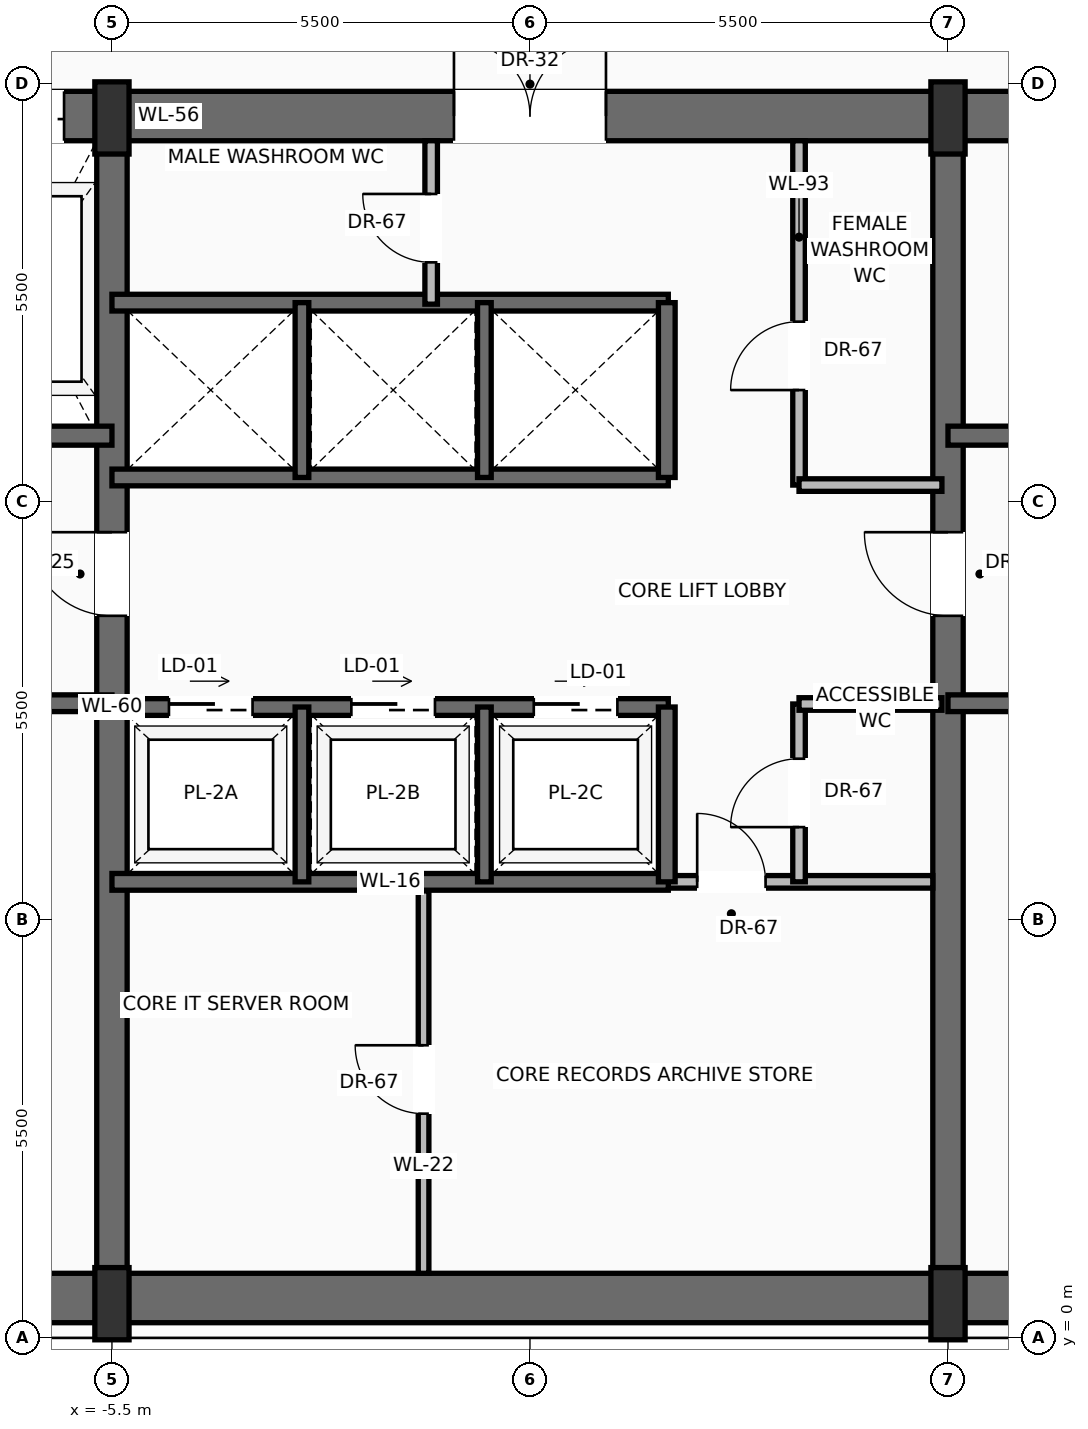
"""IFC4 building model, lengths in metres.
Left out: names, types, materials, properties, quantities, classifications, styles, units other than length and angle.
Written with IfcOpenShell. Run it as: python <this file> out.ifc"""

import sys

from ifc_helpers import new_model, si_unit, direction, frame, frame_2d, origin, origin_2d, place, context, subcontext, project, spatial, rectangle, extrude, source, transform, mapped, element, fill, save


model = new_model("IFC4")
c1 = context("Model", 3, precision=1e-05, world=origin(), true_north=direction((0.0, 1.0)))
c2 = subcontext(c1, "Body", "Model", "MODEL_VIEW")
j1 = project(units=[si_unit("LENGTHUNIT", "METRE"), si_unit("PLANEANGLEUNIT", "RADIAN")], contexts=[c1])
p1 = place(None, origin())
s1 = spatial("IfcSite", under=j1, at=p1, CompositionType="ELEMENT")
p2 = place(p1, origin())
s2 = spatial("IfcBuilding", under=s1, at=p2, CompositionType="ELEMENT")
p3 = place(p2, frame((0.0, 0.0, 196.9)))
s3 = spatial("IfcBuildingStorey", under=s2, at=p3, CompositionType="ELEMENT", Elevation=196.9)
p4 = place(p3, frame((-10.65, 0.525, 0.0), z_axis=(0.0, 0.0, 1.0), x_axis=(1.0, 0.0, 0.0)))
e1 = element("IfcWall", 1, at=p4, inside=s3, PredefinedType="SHEAR", context=c2, shape_type="SweptSolid", body=[
    extrude(rectangle(XDim=21.3, YDim=0.65, at=frame_2d((10.65, 0.0))), origin(), (0.0, 0.0, 1.0), 3.47),
])
p5 = place(p3, frame((-10.8, 16.075, 0.0), z_axis=(0.0, 0.0, 1.0), x_axis=(1.0, 0.0, 0.0)))
e2 = element("IfcWall", 2, at=p5, inside=s3, PredefinedType="SHEAR", context=c2, shape_type="SweptSolid", body=[
    extrude(rectangle(XDim=21.6, YDim=0.65, at=frame_2d((10.8, 0.0))), origin(), (0.0, 0.0, 1.0), 3.47),
])
p6 = place(p5, frame((3.37, 0.0, 0.0)))
e3 = element("IfcOpeningElement", 3, at=p6, cuts=e2, PredefinedType="OPENING", context=c2, shape_type="SweptSolid", body=[
    extrude(rectangle(XDim=1.3, YDim=2.3, at=frame_2d((0.65, 1.15))), frame((0.0, 0.335, 0.0), z_axis=(0.0, -1.0, 0.0), x_axis=(1.0, 0.0, 0.0)), (0.0, 0.0, 1.0), 0.67),
])
p7 = place(p5, frame((9.8, 0.0, 0.0)))
e4 = element("IfcOpeningElement", 4, at=p7, cuts=e2, PredefinedType="OPENING", context=c2, shape_type="SweptSolid", body=[
    extrude(rectangle(XDim=2.0, YDim=2.4, at=frame_2d((1.0, 1.2))), frame((0.0, 0.335, 0.0), z_axis=(0.0, -1.0, 0.0), x_axis=(1.0, 0.0, 0.0)), (0.0, 0.0, 1.0), 0.67),
])
p8 = place(p3, frame((-5.5, 0.525, 0.0), z_axis=(0.0, 0.0, 1.0), x_axis=(0.0, 1.0, 0.0)))
e5 = element("IfcWall", 5, at=p8, inside=s3, PredefinedType="SHEAR", context=c2, shape_type="SweptSolid", body=[
    extrude(rectangle(XDim=15.55, YDim=0.4, at=frame_2d((7.775, 0.0))), origin(), (0.0, 0.0, 1.0), 3.47),
])
p9 = place(p8, frame((8.975, 0.0, 0.0)))
e6 = element("IfcOpeningElement", 6, at=p9, cuts=e5, PredefinedType="OPENING", context=c2, shape_type="SweptSolid", body=[
    extrude(rectangle(XDim=1.1, YDim=2.2, at=frame_2d((0.55, 1.1))), frame((0.0, 0.21, 0.0), z_axis=(0.0, -1.0, 0.0), x_axis=(1.0, 0.0, 0.0)), (0.0, 0.0, 1.0), 0.42),
])
p10 = place(p3, frame((5.5, 0.525, 0.0), z_axis=(0.0, 0.0, 1.0), x_axis=(0.0, 1.0, 0.0)))
e7 = element("IfcWall", 7, at=p10, inside=s3, PredefinedType="SHEAR", context=c2, shape_type="SweptSolid", body=[
    extrude(rectangle(XDim=15.55, YDim=0.4, at=frame_2d((7.775, 0.0))), origin(), (0.0, 0.0, 1.0), 3.47),
])
p11 = place(p10, frame((8.975, 0.0, 0.0)))
e8 = element("IfcOpeningElement", 8, at=p11, cuts=e7, PredefinedType="OPENING", context=c2, shape_type="SweptSolid", body=[
    extrude(rectangle(XDim=1.1, YDim=2.2, at=frame_2d((0.55, 1.1))), frame((0.0, 0.21, 0.0), z_axis=(0.0, -1.0, 0.0), x_axis=(1.0, 0.0, 0.0)), (0.0, 0.0, 1.0), 0.42),
])
m1 = source(origin(), c2, "Body", "SweptSolid", [
    extrude(rectangle(XDim=0.45, YDim=0.95, at=origin_2d()), origin(), (0.0, 0.0, 1.0), 3.7),
])
for number, where, z_axis, x_axis in (
    (9, (-5.5, 0.45, 0.0), (0.0, 0.0, 1.0), (1.0, 0.0, 0.0)),
    (10, (5.5, 0.45, 0.0), (0.0, 0.0, 1.0), (1.0, 0.0, 0.0)),
    (11, (-5.5, 16.05, 0.0), (0.0, 0.0, 1.0), (1.0, 0.0, 0.0)),
    (12, (5.5, 16.05, 0.0), (0.0, 0.0, 1.0), (1.0, 0.0, 0.0)),
):
    element("IfcColumn", number, at=place(p3, frame(where, z_axis=z_axis, x_axis=x_axis)), inside=s3, PredefinedType="PILASTER", context=c2, shape_type="MappedRepresentation", body=[
        mapped(m1, transform((0.0, 0.0, 0.0), scale=1.0)),
    ])
p12 = place(p3, frame((-5.5, 8.35, 0.0), z_axis=(0.0, 0.0, 1.0), x_axis=(-1.0, 0.0, 0.0)))
e13 = element("IfcWall", 13, at=p12, inside=s3, PredefinedType="SOLIDWALL", context=c2, shape_type="SweptSolid", body=[
    extrude(rectangle(XDim=4.65, YDim=0.22, at=frame_2d((2.325, 0.0))), origin(), (0.0, 0.0, 1.0), 3.47),
])
p13 = place(p12, frame((2.5, 0.0, 0.0)))
e14 = element("IfcOpeningElement", 14, at=p13, cuts=e13, PredefinedType="OPENING", context=c2, shape_type="SweptSolid", body=[
    extrude(rectangle(XDim=1.15, YDim=2.2, at=frame_2d((0.575, 1.1))), frame((0.0, 0.12, 0.0), z_axis=(0.0, -1.0, 0.0), x_axis=(1.0, 0.0, 0.0)), (0.0, 0.0, 1.0), 0.24),
])
p14 = place(p3, frame((-5.5, 11.87, 0.0), z_axis=(0.0, 0.0, 1.0), x_axis=(-1.0, 0.0, 0.0)))
e15 = element("IfcWall", 15, at=p14, inside=s3, PredefinedType="SOLIDWALL", context=c2, shape_type="SweptSolid", body=[
    extrude(rectangle(XDim=4.65, YDim=0.25, at=frame_2d((2.325, 0.0))), origin(), (0.0, 0.0, 1.0), 3.47),
])
p15 = place(p14, frame((2.95, 0.0, 0.0)))
e16 = element("IfcOpeningElement", 16, at=p15, cuts=e15, PredefinedType="OPENING", context=c2, shape_type="SweptSolid", body=[
    extrude(rectangle(XDim=1.2, YDim=2.25, at=frame_2d((0.6, 1.125))), frame((0.0, 0.135, 0.0), z_axis=(0.0, -1.0, 0.0), x_axis=(1.0, 0.0, 0.0)), (0.0, 0.0, 1.0), 0.27),
])
p16 = place(p3, frame((10.15, 8.35, 0.0), z_axis=(0.0, 0.0, 1.0), x_axis=(-1.0, 0.0, 0.0)))
e17 = element("IfcWall", 17, at=p16, inside=s3, PredefinedType="SOLIDWALL", context=c2, shape_type="SweptSolid", body=[
    extrude(rectangle(XDim=4.65, YDim=0.22, at=frame_2d((2.325, 0.0))), origin(), (0.0, 0.0, 1.0), 3.47),
])
p17 = place(p16, frame((1.0, 0.0, 0.0)))
e18 = element("IfcOpeningElement", 18, at=p17, cuts=e17, PredefinedType="OPENING", context=c2, shape_type="SweptSolid", body=[
    extrude(rectangle(XDim=1.15, YDim=2.2, at=frame_2d((0.575, 1.1))), frame((0.0, 0.12, 0.0), z_axis=(0.0, -1.0, 0.0), x_axis=(1.0, 0.0, 0.0)), (0.0, 0.0, 1.0), 0.24),
])
p18 = place(p3, frame((10.15, 11.87, 0.0), z_axis=(0.0, 0.0, 1.0), x_axis=(-1.0, 0.0, 0.0)))
e19 = element("IfcWall", 19, at=p18, inside=s3, PredefinedType="SOLIDWALL", context=c2, shape_type="SweptSolid", body=[
    extrude(rectangle(XDim=4.65, YDim=0.25, at=frame_2d((2.325, 0.0))), origin(), (0.0, 0.0, 1.0), 3.47),
])
p19 = place(p18, frame((0.5, 0.0, 0.0)))
e20 = element("IfcOpeningElement", 20, at=p19, cuts=e19, PredefinedType="OPENING", context=c2, shape_type="SweptSolid", body=[
    extrude(rectangle(XDim=1.2, YDim=2.25, at=frame_2d((0.6, 1.125))), frame((0.0, 0.135, 0.0), z_axis=(0.0, -1.0, 0.0), x_axis=(1.0, 0.0, 0.0)), (0.0, 0.0, 1.0), 0.27),
])
p20 = place(p3, frame((1.82, 6.0, 0.0), z_axis=(0.0, 0.0, 1.0), x_axis=(1.0, 0.0, 0.0)))
e21 = element("IfcWall", 21, at=p20, inside=s3, PredefinedType="PARTITIONING", context=c2, shape_type="SweptSolid", body=[
    extrude(rectangle(XDim=3.48, YDim=0.165, at=frame_2d((1.74, 0.0))), origin(), (0.0, 0.0, 1.0), 3.462),
])
p21 = place(p20, frame((0.38, 0.0, 0.0)))
e22 = element("IfcOpeningElement", 22, at=p21, cuts=e21, PredefinedType="OPENING", context=c2, shape_type="SweptSolid", body=[
    extrude(rectangle(XDim=0.9, YDim=2.1, at=frame_2d((0.45, 1.05))), frame((0.0, 0.093, 0.0), z_axis=(0.0, -1.0, 0.0), x_axis=(1.0, 0.0, 0.0)), (0.0, 0.0, 1.0), 0.185),
])
p22 = place(p3, frame((-1.4, 0.85, 0.0), z_axis=(0.0, 0.0, 1.0), x_axis=(0.0, 1.0, 0.0)))
e23 = element("IfcWall", 23, at=p22, inside=s3, PredefinedType="PARTITIONING", context=c2, shape_type="SweptSolid", body=[
    extrude(rectangle(XDim=5.03, YDim=0.14, at=frame_2d((2.515, 0.0))), origin(), (0.0, 0.0, 1.0), 3.462),
])
p23 = place(p22, frame((2.1, 0.0, 0.0)))
e24 = element("IfcOpeningElement", 24, at=p23, cuts=e23, PredefinedType="OPENING", context=c2, shape_type="SweptSolid", body=[
    extrude(rectangle(XDim=0.9, YDim=2.1, at=frame_2d((0.45, 1.05))), frame((0.0, 0.08, 0.0), z_axis=(0.0, -1.0, 0.0), x_axis=(1.0, 0.0, 0.0)), (0.0, 0.0, 1.0), 0.16),
])
p24 = place(p3, frame((3.54, 6.0, 0.0), z_axis=(0.0, 0.0, 1.0), x_axis=(0.0, 1.0, 0.0)))
e25 = element("IfcWall", 25, at=p24, inside=s3, PredefinedType="PARTITIONING", context=c2, shape_type="SweptSolid", body=[
    extrude(rectangle(XDim=2.34, YDim=0.165, at=frame_2d((1.17, 0.0))), origin(), (0.0, 0.0, 1.0), 3.462),
])
p25 = place(p24, frame((0.72, 0.0, 0.0)))
e26 = element("IfcOpeningElement", 26, at=p25, cuts=e25, PredefinedType="OPENING", context=c2, shape_type="SweptSolid", body=[
    extrude(rectangle(XDim=0.9, YDim=2.1, at=frame_2d((0.45, 1.05))), frame((0.0, 0.093, 0.0), z_axis=(0.0, -1.0, 0.0), x_axis=(1.0, 0.0, 0.0)), (0.0, 0.0, 1.0), 0.185),
])
p26 = place(p3, frame((3.54, 8.34, 0.0), z_axis=(0.0, 0.0, 1.0), x_axis=(1.0, 0.0, 0.0)))
e27 = element("IfcWall", 27, at=p26, inside=s3, PredefinedType="PARTITIONING", context=c2, shape_type="SweptSolid", body=[
    extrude(rectangle(XDim=1.88, YDim=0.165, at=frame_2d((0.94, 0.0))), origin(), (0.0, 0.0, 1.0), 3.462),
])
p27 = place(p3, frame((-5.5, 6.0, 0.0), z_axis=(0.0, 0.0, 1.0), x_axis=(1.0, 0.0, 0.0)))
e28 = element("IfcWall", 28, at=p27, inside=s3, PredefinedType="SOLIDWALL", context=c2, shape_type="SweptSolid", body=[
    extrude(rectangle(XDim=7.32, YDim=0.22, at=frame_2d((3.66, 0.0))), origin(), (0.0, 0.0, 1.0), 3.47),
])
p28 = place(p3, frame((-5.5, 8.3, 0.0), z_axis=(0.0, 0.0, 1.0), x_axis=(1.0, 0.0, 0.0)))
e29 = element("IfcWall", 29, at=p28, inside=s3, PredefinedType="SOLIDWALL", context=c2, shape_type="SweptSolid", body=[
    extrude(rectangle(XDim=7.32, YDim=0.22, at=frame_2d((3.66, 0.0))), origin(), (0.0, 0.0, 1.0), 3.47),
])
p29 = place(p28, frame((0.75, 0.0, 0.0)))
e30 = element("IfcOpeningElement", 30, at=p29, cuts=e29, PredefinedType="OPENING", context=c2, shape_type="SweptSolid", body=[
    extrude(rectangle(XDim=1.1, YDim=2.2, at=frame_2d((0.55, 1.1))), frame((0.0, 0.12, 0.0), z_axis=(0.0, -1.0, 0.0), x_axis=(1.0, 0.0, 0.0)), (0.0, 0.0, 1.0), 0.24),
])
p30 = place(p28, frame((3.15, 0.0, 0.0)))
e31 = element("IfcOpeningElement", 31, at=p30, cuts=e29, PredefinedType="OPENING", context=c2, shape_type="SweptSolid", body=[
    extrude(rectangle(XDim=1.1, YDim=2.2, at=frame_2d((0.55, 1.1))), frame((0.0, 0.12, 0.0), z_axis=(0.0, -1.0, 0.0), x_axis=(1.0, 0.0, 0.0)), (0.0, 0.0, 1.0), 0.24),
])
p31 = place(p28, frame((5.55, 0.0, 0.0)))
e32 = element("IfcOpeningElement", 32, at=p31, cuts=e29, PredefinedType="OPENING", context=c2, shape_type="SweptSolid", body=[
    extrude(rectangle(XDim=1.1, YDim=2.2, at=frame_2d((0.55, 1.1))), frame((0.0, 0.12, 0.0), z_axis=(0.0, -1.0, 0.0), x_axis=(1.0, 0.0, 0.0)), (0.0, 0.0, 1.0), 0.24),
])
p32 = place(p3, frame((1.8, 6.0, 0.0), z_axis=(0.0, 0.0, 1.0), x_axis=(0.0, 1.0, 0.0)))
e33 = element("IfcWall", 33, at=p32, inside=s3, PredefinedType="SOLIDWALL", context=c2, shape_type="SweptSolid", body=[
    extrude(rectangle(XDim=2.3, YDim=0.22, at=frame_2d((1.15, 0.0))), origin(), (0.0, 0.0, 1.0), 3.47),
])
for number, where, z_axis, x_axis in (
    (34, (-3.0, 6.0, 0.0), (0.0, 0.0, 1.0), (0.0, 1.0, 0.0)),
    (35, (-0.6, 6.0, 0.0), (0.0, 0.0, 1.0), (0.0, 1.0, 0.0)),
):
    element("IfcWall", number, at=place(p3, frame(where, z_axis=z_axis, x_axis=x_axis)), inside=s3, PredefinedType="SOLIDWALL", context=c2, shape_type="SweptSolid", body=[
        extrude(rectangle(XDim=2.3, YDim=0.18, at=frame_2d((1.15, 0.0))), origin(), (0.0, 0.0, 1.0), 3.47),
    ])
for number, where, z_axis, x_axis in (
    (36, (-5.5, 11.32, 0.0), (0.0, 0.0, 1.0), (1.0, 0.0, 0.0)),
    (37, (-5.5, 13.62, 0.0), (0.0, 0.0, 1.0), (1.0, 0.0, 0.0)),
):
    element("IfcWall", number, at=place(p3, frame(where, z_axis=z_axis, x_axis=x_axis)), inside=s3, PredefinedType="SOLIDWALL", context=c2, shape_type="SweptSolid", body=[
        extrude(rectangle(XDim=7.32, YDim=0.22, at=frame_2d((3.66, 0.0))), origin(), (0.0, 0.0, 1.0), 3.47),
    ])
p33 = place(p3, frame((1.8, 11.32, 0.0), z_axis=(0.0, 0.0, 1.0), x_axis=(0.0, 1.0, 0.0)))
e38 = element("IfcWall", 38, at=p33, inside=s3, PredefinedType="SOLIDWALL", context=c2, shape_type="SweptSolid", body=[
    extrude(rectangle(XDim=2.3, YDim=0.22, at=frame_2d((1.15, 0.0))), origin(), (0.0, 0.0, 1.0), 3.47),
])
for number, where, z_axis, x_axis in (
    (39, (-3.0, 11.32, 0.0), (0.0, 0.0, 1.0), (0.0, 1.0, 0.0)),
    (40, (-0.6, 11.32, 0.0), (0.0, 0.0, 1.0), (0.0, 1.0, 0.0)),
):
    element("IfcWall", number, at=place(p3, frame(where, z_axis=z_axis, x_axis=x_axis)), inside=s3, PredefinedType="SOLIDWALL", context=c2, shape_type="SweptSolid", body=[
        extrude(rectangle(XDim=2.3, YDim=0.18, at=frame_2d((1.15, 0.0))), origin(), (0.0, 0.0, 1.0), 3.47),
    ])
p34 = place(p3, frame((-1.3, 13.6, 0.0), z_axis=(0.0, 0.0, 1.0), x_axis=(0.0, 1.0, 0.0)))
e41 = element("IfcWall", 41, at=p34, inside=s3, PredefinedType="PARTITIONING", context=c2, shape_type="SweptSolid", body=[
    extrude(rectangle(XDim=2.15, YDim=0.165, at=frame_2d((1.075, 0.0))), origin(), (0.0, 0.0, 1.0), 3.462),
])
p35 = place(p34, frame((0.55, 0.0, 0.0)))
e42 = element("IfcOpeningElement", 42, at=p35, cuts=e41, PredefinedType="OPENING", context=c2, shape_type="SweptSolid", body=[
    extrude(rectangle(XDim=0.9, YDim=2.1, at=frame_2d((0.45, 1.05))), frame((0.0, 0.093, 0.0), z_axis=(0.0, -1.0, 0.0), x_axis=(1.0, 0.0, 0.0)), (0.0, 0.0, 1.0), 0.185),
])
p36 = place(p3, frame((3.54, 11.22, 0.0), z_axis=(0.0, 0.0, 1.0), x_axis=(0.0, 1.0, 0.0)))
e43 = element("IfcWall", 43, at=p36, inside=s3, PredefinedType="PARTITIONING", context=c2, shape_type="SweptSolid", body=[
    extrude(rectangle(XDim=4.53, YDim=0.165, at=frame_2d((2.265, 0.0))), origin(), (0.0, 0.0, 1.0), 3.462),
])
p37 = place(p36, frame((1.25, 0.0, 0.0)))
e44 = element("IfcOpeningElement", 44, at=p37, cuts=e43, PredefinedType="OPENING", context=c2, shape_type="SweptSolid", body=[
    extrude(rectangle(XDim=0.9, YDim=2.1, at=frame_2d((0.45, 1.05))), frame((0.0, 0.093, 0.0), z_axis=(0.0, -1.0, 0.0), x_axis=(1.0, 0.0, 0.0)), (0.0, 0.0, 1.0), 0.185),
])
p38 = place(p3, frame((3.54, 11.22, 0.0), z_axis=(0.0, 0.0, 1.0), x_axis=(1.0, 0.0, 0.0)))
e45 = element("IfcWall", 45, at=p38, inside=s3, PredefinedType="PARTITIONING", context=c2, shape_type="SweptSolid", body=[
    extrude(rectangle(XDim=1.88, YDim=0.165, at=frame_2d((0.94, 0.0))), origin(), (0.0, 0.0, 1.0), 3.462),
])
m2 = source(origin(), c2, "Body", "SweptSolid", [
    extrude(rectangle(XDim=1.1, YDim=2.2, at=frame_2d((0.55, 1.1))), frame((0.0, 0.025, 0.0), z_axis=(0.0, -1.0, 0.0), x_axis=(1.0, 0.0, 0.0)), (0.0, 0.0, 1.0), 0.05),
])
p39 = place(p9, origin())
e46 = element("IfcDoor", 46, at=p39, inside=s3, OperationType="SINGLE_SWING_RIGHT", PredefinedType="DOOR", context=c2, shape_type="MappedRepresentation", body=[
    mapped(m2, transform((0.0, 0.0, 0.0), scale=1.0)),
])
fill(e6, e46)
m3 = source(origin(), c2, "Body", "SweptSolid", [
    extrude(rectangle(XDim=1.3, YDim=2.3, at=frame_2d((0.65, 1.15))), frame((0.0, 0.025, 0.0), z_axis=(0.0, -1.0, 0.0), x_axis=(1.0, 0.0, 0.0)), (0.0, 0.0, 1.0), 0.05),
])
p40 = place(p6, origin())
e47 = element("IfcDoor", 47, at=p40, inside=s3, OperationType="SLIDING_TO_RIGHT", PredefinedType="DOOR", context=c2, shape_type="MappedRepresentation", body=[
    mapped(m3, transform((0.0, 0.0, 0.0), scale=1.0)),
])
fill(e3, e47)
p41 = place(p11, origin())
e48 = element("IfcDoor", 48, at=p41, inside=s3, OperationType="SINGLE_SWING_RIGHT", PredefinedType="DOOR", context=c2, shape_type="MappedRepresentation", body=[
    mapped(m2, transform((0.0, 0.0, 0.0), scale=1.0)),
])
fill(e8, e48)
m4 = source(origin(), c2, "Body", "SweptSolid", [
    extrude(rectangle(XDim=2.0, YDim=2.4, at=frame_2d((1.0, 1.2))), frame((0.0, 0.025, 0.0), z_axis=(0.0, -1.0, 0.0), x_axis=(1.0, 0.0, 0.0)), (0.0, 0.0, 1.0), 0.05),
])
p42 = place(p7, origin())
e49 = element("IfcDoor", 49, at=p42, inside=s3, OperationType="DOUBLE_DOOR_SINGLE_SWING", PredefinedType="DOOR", context=c2, shape_type="MappedRepresentation", body=[
    mapped(m4, transform((0.0, 0.0, 0.0), scale=1.0)),
])
fill(e4, e49)
m5 = source(origin(), c2, "Body", "SweptSolid", [
    extrude(rectangle(XDim=0.9, YDim=2.1, at=frame_2d((0.45, 1.05))), frame((0.0, 0.025, 0.0), z_axis=(0.0, -1.0, 0.0), x_axis=(1.0, 0.0, 0.0)), (0.0, 0.0, 1.0), 0.05),
])
p43 = place(p21, origin())
e50 = element("IfcDoor", 50, at=p43, inside=s3, OperationType="SINGLE_SWING_LEFT", PredefinedType="DOOR", context=c2, shape_type="MappedRepresentation", body=[
    mapped(m5, transform((0.0, 0.0, 0.0), scale=1.0)),
])
fill(e22, e50)
p44 = place(p23, origin())
e51 = element("IfcDoor", 51, at=p44, inside=s3, OperationType="SINGLE_SWING_RIGHT", PredefinedType="DOOR", context=c2, shape_type="MappedRepresentation", body=[
    mapped(m5, transform((0.0, 0.0, 0.0), scale=1.0)),
])
fill(e24, e51)
p45 = place(p25, origin())
e52 = element("IfcDoor", 52, at=p45, inside=s3, OperationType="SINGLE_SWING_LEFT", PredefinedType="DOOR", context=c2, shape_type="MappedRepresentation", body=[
    mapped(m5, transform((0.0, 0.0, 0.0), scale=1.0)),
])
fill(e26, e52)
m6 = source(origin(), c2, "Body", "SweptSolid", [
    extrude(rectangle(XDim=1.1, YDim=2.2, at=frame_2d((0.55, 1.1))), frame((0.0, 0.025, 0.0), z_axis=(0.0, -1.0, 0.0), x_axis=(1.0, 0.0, 0.0)), (0.0, 0.0, 1.0), 0.05),
])
p46 = place(p29, origin())
e53 = element("IfcDoor", 53, at=p46, inside=s3, OperationType="SLIDING_TO_LEFT", PredefinedType="DOOR", context=c2, shape_type="MappedRepresentation", body=[
    mapped(m6, transform((0.0, 0.0, 0.0), scale=1.0)),
])
fill(e30, e53)
p47 = place(p30, origin())
e54 = element("IfcDoor", 54, at=p47, inside=s3, OperationType="SLIDING_TO_LEFT", PredefinedType="DOOR", context=c2, shape_type="MappedRepresentation", body=[
    mapped(m6, transform((0.0, 0.0, 0.0), scale=1.0)),
])
fill(e31, e54)
p48 = place(p31, origin())
e55 = element("IfcDoor", 55, at=p48, inside=s3, OperationType="SLIDING_TO_LEFT", PredefinedType="DOOR", context=c2, shape_type="MappedRepresentation", body=[
    mapped(m6, transform((0.0, 0.0, 0.0), scale=1.0)),
])
fill(e32, e55)
p49 = place(p35, origin())
e56 = element("IfcDoor", 56, at=p49, inside=s3, OperationType="SINGLE_SWING_RIGHT", PredefinedType="DOOR", context=c2, shape_type="MappedRepresentation", body=[
    mapped(m5, transform((0.0, 0.0, 0.0), scale=1.0)),
])
fill(e42, e56)
p50 = place(p37, origin())
e57 = element("IfcDoor", 57, at=p50, inside=s3, OperationType="SINGLE_SWING_LEFT", PredefinedType="DOOR", context=c2, shape_type="MappedRepresentation", body=[
    mapped(m5, transform((0.0, 0.0, 0.0), scale=1.0)),
])
fill(e44, e57)
save(model, sys.argv[1])
